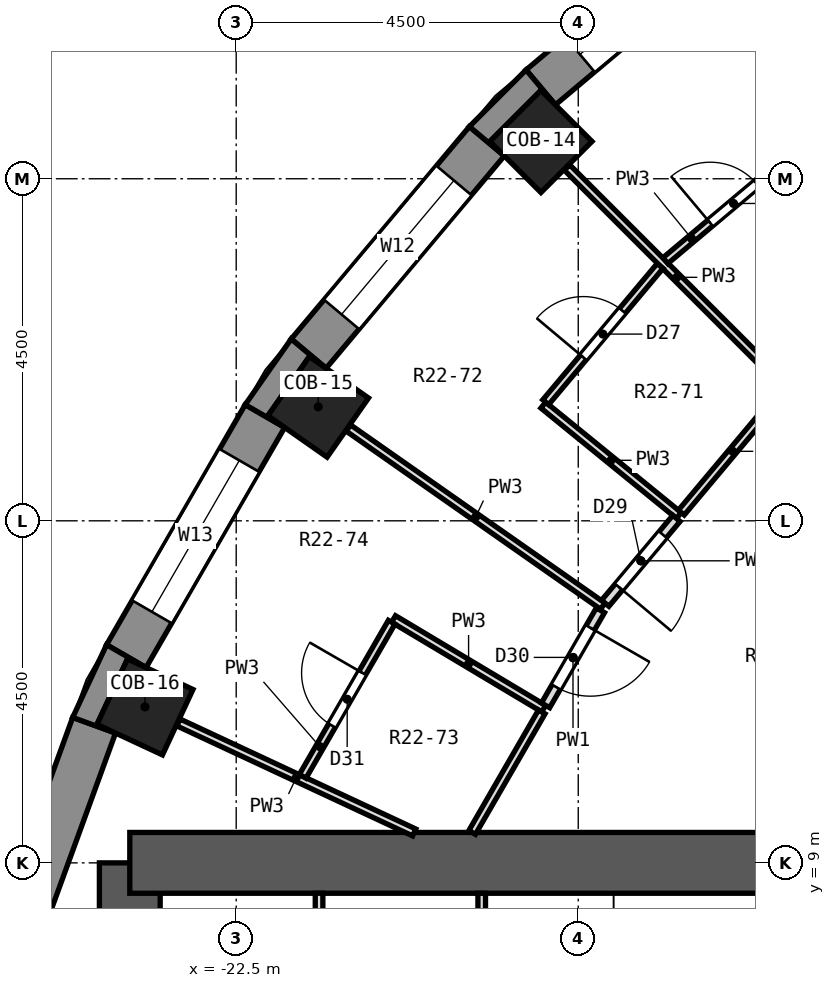
"""IFC4 building model, lengths in metres.
Left out: names, types, materials, properties, quantities, classifications, styles, units other than length and angle.
Written with IfcOpenShell. Run it as: python <this file> out.ifc"""

import sys

from ifc_helpers import new_model, si_unit, direction, frame, frame_2d, origin, origin_2d, place, context, subcontext, project, spatial, polyline, rectangle, outline, extrude, element, fill, save


model = new_model("IFC4")
c1 = context("Model", 3, precision=1e-05, world=origin(), true_north=direction((0.0, 1.0)))
c2 = subcontext(c1, "Body", "Model", "MODEL_VIEW")
j1 = project(units=[si_unit("LENGTHUNIT", "METRE"), si_unit("PLANEANGLEUNIT", "RADIAN")], contexts=[c1])
p1 = place(None, origin())
s1 = spatial("IfcSite", under=j1, at=p1, CompositionType="ELEMENT")
p2 = place(p1, origin())
s2 = spatial("IfcBuilding", under=s1, at=p2, CompositionType="ELEMENT")
p3 = place(p2, frame((0.0, 0.0, 141.4)))
s3 = spatial("IfcBuildingStorey", under=s2, at=p3, CompositionType="ELEMENT", Elevation=141.4)
for number, where, z_axis, x_axis in (
    (1, (-18.491, 18.491, 0.0), (0.0, 0.0, 1.0), (-0.707, 0.707, 0.0)),
    (2, (-21.421, 14.999, 0.0), (0.0, 0.0, 1.0), (-0.819, 0.574, 0.0)),
    (3, (-23.7, 11.052, 0.0), (0.0, 0.0, 1.0), (-0.906, 0.423, 0.0)),
):
    element("IfcColumn", number, at=place(p3, frame(where, z_axis=z_axis, x_axis=x_axis)), inside=s3, PredefinedType="COLUMN", context=c2, shape_type="SweptSolid", body=[
        extrude(rectangle(XDim=0.95, YDim=0.95, at=origin_2d()), origin(), (0.0, 0.0, 1.0), 3.3),
    ])
p4 = place(p3, frame((-23.9, -9.0, 0.0), z_axis=(0.0, 0.0, 1.0), x_axis=(0.0, 1.0, 0.0)))
e4 = element("IfcWall", 4, at=p4, inside=s3, PredefinedType="SHEAR", context=c2, shape_type="SweptSolid", body=[
    extrude(rectangle(XDim=18.0, YDim=0.8, at=frame_2d((9.0, 0.0))), origin(), (0.0, 0.0, 1.0), 3.3),
])
p5 = place(p3, frame((-13.5, 9.0, 0.0), z_axis=(0.0, 0.0, 1.0), x_axis=(-1.0, 0.0, 0.0)))
e5 = element("IfcWall", 5, at=p5, inside=s3, PredefinedType="SHEAR", context=c2, shape_type="SweptSolid", body=[
    extrude(rectangle(XDim=10.4, YDim=0.8, at=frame_2d((5.2, 0.0))), origin(), (0.0, 0.0, 1.0), 3.3),
])
p6 = place(p3, frame((-15.699, 21.547, 0.0), z_axis=(0.0, 0.0, 1.0), x_axis=(-0.766055462616, -0.642774476932, 0.0)))
e6 = element("IfcWall", 6, at=p6, inside=s3, PredefinedType="SOLIDWALL", context=c2, shape_type="SweptSolid", body=[
    extrude(rectangle(XDim=3.648, YDim=0.6, at=frame_2d((1.824, 0.0))), origin(), (0.0, 0.0, 1.0), 2.8),
])
p7 = place(p6, frame((0.674, 0.0, 0.9)))
e7 = element("IfcOpeningElement", 7, at=p7, cuts=e6, PredefinedType="OPENING", context=c2, shape_type="SweptSolid", body=[
    extrude(rectangle(XDim=2.3, YDim=1.8, at=frame_2d((1.15, 0.9))), frame((0.0, 0.312, 0.0), z_axis=(0.0, -1.0, 0.0), x_axis=(1.0, 0.0, 0.0)), (0.0, 0.0, 1.0), 0.624),
])
p8 = place(p3, frame((-19.202, 18.494, 0.0), z_axis=(0.0, 0.0, 1.0), x_axis=(-0.642774476932, -0.766055462616, 0.0)))
e8 = element("IfcWall", 8, at=p8, inside=s3, PredefinedType="SOLIDWALL", context=c2, shape_type="SweptSolid", body=[
    extrude(rectangle(XDim=3.648, YDim=0.6, at=frame_2d((1.824, 0.0))), origin(), (0.0, 0.0, 1.0), 2.8),
])
p9 = place(p8, frame((0.674, 0.0, 0.9)))
e9 = element("IfcOpeningElement", 9, at=p9, cuts=e8, PredefinedType="OPENING", context=c2, shape_type="SweptSolid", body=[
    extrude(rectangle(XDim=2.3, YDim=1.8, at=frame_2d((1.15, 0.9))), frame((0.0, 0.312, 0.0), z_axis=(0.0, -1.0, 0.0), x_axis=(1.0, 0.0, 0.0)), (0.0, 0.0, 1.0), 0.624),
])
p10 = place(p3, frame((-22.122, 14.878, 0.0), z_axis=(0.0, 0.0, 1.0), x_axis=(-0.499954196102, -0.866051847062, 0.0)))
e10 = element("IfcWall", 10, at=p10, inside=s3, PredefinedType="SOLIDWALL", context=c2, shape_type="SweptSolid", body=[
    extrude(rectangle(XDim=3.648, YDim=0.6, at=frame_2d((1.824, 0.0))), origin(), (0.0, 0.0, 1.0), 2.8),
])
p11 = place(p10, frame((0.674, 0.0, 0.9)))
e11 = element("IfcOpeningElement", 11, at=p11, cuts=e10, PredefinedType="OPENING", context=c2, shape_type="SweptSolid", body=[
    extrude(rectangle(XDim=2.3, YDim=1.8, at=frame_2d((1.15, 0.9))), frame((0.0, 0.312, 0.0), z_axis=(0.0, -1.0, 0.0), x_axis=(1.0, 0.0, 0.0)), (0.0, 0.0, 1.0), 0.624),
])
p12 = place(p3, frame((-24.369, 10.811, 0.0), z_axis=(0.0, 0.0, 1.0), x_axis=(-0.341990236633, -0.939703505393, 0.0)))
e12 = element("IfcWall", 12, at=p12, inside=s3, PredefinedType="SOLIDWALL", context=c2, shape_type="SweptSolid", body=[
    extrude(rectangle(XDim=3.648, YDim=0.6, at=frame_2d((1.824, 0.0))), origin(), (0.0, 0.0, 1.0), 2.8),
])
p13 = place(p3, origin())
e13 = element("IfcWall", 13, at=p13, inside=s3, PredefinedType="SOLIDWALL", context=c2, shape_type="SweptSolid", body=[
    extrude(outline(polyline([(-18.686, 19.432), (-19.432, 18.686), (-18.972, 18.301), (-19.163, 18.491), (-18.491, 19.163), (-18.301, 18.972), (-18.686, 19.432)])), origin(), (0.0, 0.0, 1.0), 2.8),
])
p14 = place(p3, origin())
e14 = element("IfcWall", 14, at=p14, inside=s3, PredefinedType="SOLIDWALL", context=c2, shape_type="SweptSolid", body=[
    extrude(outline(polyline([(-22.382, 15.028), (-21.862, 14.728), (-22.083, 14.882), (-21.538, 15.661), (-21.317, 15.506), (-21.777, 15.892), (-22.382, 15.028)])), origin(), (0.0, 0.0, 1.0), 2.8),
])
p15 = place(p3, origin())
e15 = element("IfcWall", 15, at=p15, inside=s3, PredefinedType="SOLIDWALL", context=c2, shape_type="SweptSolid", body=[
    extrude(outline(polyline([(-24.651, 10.913), (-24.087, 10.708), (-24.331, 10.822), (-23.93, 11.683), (-23.686, 11.569), (-24.206, 11.869), (-24.651, 10.913)])), origin(), (0.0, 0.0, 1.0), 2.8),
])
p16 = place(p3, frame((-18.148, 18.148, 0.0), z_axis=(0.0, 0.0, 1.0), x_axis=(0.707106781187, -0.707106781187, 0.0)))
e16 = element("IfcWall", 16, at=p16, inside=s3, PredefinedType="PARTITIONING", context=c2, shape_type="SweptSolid", body=[
    extrude(rectangle(XDim=4.085, YDim=0.1, at=frame_2d((2.043, 0.0))), origin(), (0.0, 0.0, 1.0), 2.8),
])
p17 = place(p3, frame((-18.46, 15.022, 0.0), z_axis=(0.0, 0.0, 1.0), x_axis=(0.775591007639, -0.6312357633, 0.0)))
e17 = element("IfcWall", 17, at=p17, inside=s3, PredefinedType="PARTITIONING", context=c2, shape_type="SweptSolid", body=[
    extrude(rectangle(XDim=2.3, YDim=0.1, at=frame_2d((1.15, 0.0))), origin(), (0.0, 0.0, 1.0), 2.8),
])
p18 = place(p3, frame((-21.024, 14.721, 0.0), z_axis=(0.0, 0.0, 1.0), x_axis=(0.819108383097, -0.573638785945, 0.0)))
e18 = element("IfcWall", 18, at=p18, inside=s3, PredefinedType="PARTITIONING", context=c2, shape_type="SweptSolid", body=[
    extrude(rectangle(XDim=4.086, YDim=0.1, at=frame_2d((2.043, 0.0))), origin(), (0.0, 0.0, 1.0), 2.8),
])
p19 = place(p3, frame((-20.43, 12.209, 0.0), z_axis=(0.0, 0.0, 1.0), x_axis=(0.858446574718, -0.512902991174, 0.0)))
e19 = element("IfcWall", 19, at=p19, inside=s3, PredefinedType="PARTITIONING", context=c2, shape_type="SweptSolid", body=[
    extrude(rectangle(XDim=2.301, YDim=0.1, at=frame_2d((1.15, 0.0))), origin(), (0.0, 0.0, 1.0), 2.8),
])
p20 = place(p3, frame((-23.26, 10.847, 0.0), z_axis=(0.0, 0.0, 1.0), x_axis=(0.906223222272, -0.422799564114, 0.0)))
e20 = element("IfcWall", 20, at=p20, inside=s3, PredefinedType="PARTITIONING", context=c2, shape_type="SweptSolid", body=[
    extrude(rectangle(XDim=3.423, YDim=0.1, at=frame_2d((1.711, 0.0))), origin(), (0.0, 0.0, 1.0), 2.8),
])
p21 = place(p3, frame((-16.853, 16.923, 0.0), z_axis=(0.0, 0.0, 1.0), x_axis=(0.765924716163, 0.642930267735, 0.0)))
e21 = element("IfcWall", 21, at=p21, inside=s3, PredefinedType="PARTITIONING", context=c2, shape_type="SweptSolid", body=[
    extrude(rectangle(XDim=2.34, YDim=0.1, at=frame_2d((1.17, 0.0))), origin(), (0.0, 0.0, 1.0), 2.8),
])
p22 = place(p21, frame((0.769, 0.0, 0.0)))
e22 = element("IfcOpeningElement", 22, at=p22, cuts=e21, PredefinedType="OPENING", context=c2, shape_type="SweptSolid", body=[
    extrude(rectangle(XDim=0.8, YDim=2.1, at=frame_2d((0.4, 1.05))), frame((0.0, 0.062, 0.0), z_axis=(0.0, -1.0, 0.0), x_axis=(1.0, 0.0, 0.0)), (0.0, 0.0, 1.0), 0.124),
])
p23 = place(p3, frame((-16.644, 13.608, 0.0), z_axis=(0.0, 0.0, 1.0), x_axis=(0.642715569181, 0.766104886508, 0.0)))
e23 = element("IfcWall", 23, at=p23, inside=s3, PredefinedType="PARTITIONING", context=c2, shape_type="SweptSolid", body=[
    extrude(rectangle(XDim=2.103, YDim=0.1, at=frame_2d((1.052, 0.0))), origin(), (0.0, 0.0, 1.0), 2.8),
])
p24 = place(p3, frame((-17.645, 12.415, 0.0), z_axis=(0.0, 0.0, 1.0), x_axis=(0.642669367872, 0.766143644233, 0.0)))
e24 = element("IfcWall", 24, at=p24, inside=s3, PredefinedType="PARTITIONING", context=c2, shape_type="SweptSolid", body=[
    extrude(rectangle(XDim=1.457, YDim=0.125, at=frame_2d((0.729, 0.0))), origin(), (0.0, 0.0, 1.0), 2.8),
])
p25 = place(p24, frame((0.279, 0.0, 0.0)))
e25 = element("IfcOpeningElement", 25, at=p25, cuts=e24, PredefinedType="OPENING", context=c2, shape_type="SweptSolid", body=[
    extrude(rectangle(XDim=0.9, YDim=2.1, at=frame_2d((0.45, 1.05))), frame((0.0, 0.074, 0.0), z_axis=(0.0, -1.0, 0.0), x_axis=(1.0, 0.0, 0.0)), (0.0, 0.0, 1.0), 0.149),
])
p26 = place(p3, frame((-18.428, 15.06, 0.0), z_axis=(0.0, 0.0, 1.0), x_axis=(0.642930267735, 0.765924716163, 0.0)))
e26 = element("IfcWall", 26, at=p26, inside=s3, PredefinedType="PARTITIONING", context=c2, shape_type="SweptSolid", body=[
    extrude(rectangle(XDim=2.34, YDim=0.1, at=frame_2d((1.17, 0.0))), origin(), (0.0, 0.0, 1.0), 2.8),
])
p27 = place(p26, frame((0.77, 0.0, 0.0)))
e27 = element("IfcOpeningElement", 27, at=p27, cuts=e26, PredefinedType="OPENING", context=c2, shape_type="SweptSolid", body=[
    extrude(rectangle(XDim=0.8, YDim=2.1, at=frame_2d((0.4, 1.05))), frame((0.0, 0.062, 0.0), z_axis=(0.0, -1.0, 0.0), x_axis=(1.0, 0.0, 0.0)), (0.0, 0.0, 1.0), 0.124),
])
p28 = place(p3, frame((-19.396, 9.4, 0.0), z_axis=(0.0, 0.0, 1.0), x_axis=(0.500210961829, 0.865903570651, 0.0)))
e28 = element("IfcWall", 28, at=p28, inside=s3, PredefinedType="PARTITIONING", context=c2, shape_type="SweptSolid", body=[
    extrude(rectangle(XDim=1.831, YDim=0.1, at=frame_2d((0.916, 0.0))), origin(), (0.0, 0.0, 1.0), 2.8),
])
p29 = place(p3, frame((-18.43, 11.072, 0.0), z_axis=(0.0, 0.0, 1.0), x_axis=(0.499849317439, 0.866112382925, 0.0)))
e29 = element("IfcWall", 29, at=p29, inside=s3, PredefinedType="PARTITIONING", context=c2, shape_type="SweptSolid", body=[
    extrude(rectangle(XDim=1.444, YDim=0.125, at=frame_2d((0.722, 0.0))), origin(), (0.0, 0.0, 1.0), 2.8),
])
p30 = place(p29, frame((0.278, 0.0, 0.0)))
e30 = element("IfcOpeningElement", 30, at=p30, cuts=e29, PredefinedType="OPENING", context=c2, shape_type="SweptSolid", body=[
    extrude(rectangle(XDim=0.9, YDim=2.1, at=frame_2d((0.45, 1.05))), frame((0.0, 0.074, 0.0), z_axis=(0.0, -1.0, 0.0), x_axis=(1.0, 0.0, 0.0)), (0.0, 0.0, 1.0), 0.149),
])
p31 = place(p3, frame((-21.625, 10.139, 0.0), z_axis=(0.0, 0.0, 1.0), x_axis=(0.499999433879, 0.866025730634, 0.0)))
e31 = element("IfcWall", 31, at=p31, inside=s3, PredefinedType="PARTITIONING", context=c2, shape_type="SweptSolid", body=[
    extrude(rectangle(XDim=2.34, YDim=0.1, at=frame_2d((1.17, 0.0))), origin(), (0.0, 0.0, 1.0), 2.8),
])
p32 = place(p31, frame((0.77, 0.0, 0.0)))
e32 = element("IfcOpeningElement", 32, at=p32, cuts=e31, PredefinedType="OPENING", context=c2, shape_type="SweptSolid", body=[
    extrude(rectangle(XDim=0.8, YDim=2.1, at=frame_2d((0.4, 1.05))), frame((0.0, 0.062, 0.0), z_axis=(0.0, -1.0, 0.0), x_axis=(1.0, 0.0, 0.0)), (0.0, 0.0, 1.0), 0.124),
])
p33 = place(p3, frame((-19.27, 5.25, 0.0), z_axis=(0.0, 0.0, 1.0), x_axis=(0.0, 1.0, 0.0)))
e33 = element("IfcWall", 33, at=p33, inside=s3, PredefinedType="PARTITIONING", context=c2, shape_type="SweptSolid", body=[
    extrude(rectangle(XDim=3.35, YDim=0.1, at=frame_2d((1.675, 0.0))), origin(), (0.0, 0.0, 1.0), 2.8),
])
p34 = place(p3, frame((-21.41, 5.25, 0.0), z_axis=(0.0, 0.0, 1.0), x_axis=(0.0, 1.0, 0.0)))
e34 = element("IfcWall", 34, at=p34, inside=s3, PredefinedType="PARTITIONING", context=c2, shape_type="SweptSolid", body=[
    extrude(rectangle(XDim=3.35, YDim=0.1, at=frame_2d((1.675, 0.0))), origin(), (0.0, 0.0, 1.0), 2.8),
])
p35 = place(p34, frame((1.225, 0.0, 0.0)))
e35 = element("IfcOpeningElement", 35, at=p35, cuts=e34, PredefinedType="OPENING", context=c2, shape_type="SweptSolid", body=[
    extrude(rectangle(XDim=0.9, YDim=2.1, at=frame_2d((0.45, 1.05))), frame((0.0, 0.062, 0.0), z_axis=(0.0, -1.0, 0.0), x_axis=(1.0, 0.0, 0.0)), (0.0, 0.0, 1.0), 0.124),
])
p36 = place(p7, origin())
e36 = element("IfcWindow", 36, at=p36, inside=s3, PartitioningType="SINGLE_PANEL", PredefinedType="WINDOW", context=c2, shape_type="SweptSolid", body=[
    extrude(rectangle(XDim=2.3, YDim=1.8, at=frame_2d((1.15, 0.9))), frame((0.0, 0.18, 0.0), z_axis=(0.0, -1.0, 0.0), x_axis=(1.0, 0.0, 0.0)), (0.0, 0.0, 1.0), 0.06),
])
fill(e7, e36)
p37 = place(p9, origin())
e37 = element("IfcWindow", 37, at=p37, inside=s3, PartitioningType="SINGLE_PANEL", PredefinedType="WINDOW", context=c2, shape_type="SweptSolid", body=[
    extrude(rectangle(XDim=2.3, YDim=1.8, at=frame_2d((1.15, 0.9))), frame((0.0, 0.18, 0.0), z_axis=(0.0, -1.0, 0.0), x_axis=(1.0, 0.0, 0.0)), (0.0, 0.0, 1.0), 0.06),
])
fill(e9, e37)
p38 = place(p11, origin())
e38 = element("IfcWindow", 38, at=p38, inside=s3, PartitioningType="SINGLE_PANEL", PredefinedType="WINDOW", context=c2, shape_type="SweptSolid", body=[
    extrude(rectangle(XDim=2.3, YDim=1.8, at=frame_2d((1.15, 0.9))), frame((0.0, 0.18, 0.0), z_axis=(0.0, -1.0, 0.0), x_axis=(1.0, 0.0, 0.0)), (0.0, 0.0, 1.0), 0.06),
])
fill(e11, e38)
p39 = place(p22, origin())
e39 = element("IfcDoor", 39, at=p39, inside=s3, OperationType="SINGLE_SWING_LEFT", PredefinedType="DOOR", context=c2, shape_type="SweptSolid", body=[
    extrude(rectangle(XDim=0.8, YDim=2.1, at=frame_2d((0.4, 1.05))), frame((0.0, 0.025, 0.0), z_axis=(0.0, -1.0, 0.0), x_axis=(1.0, 0.0, 0.0)), (0.0, 0.0, 1.0), 0.05),
])
fill(e22, e39)
p40 = place(p27, origin())
e40 = element("IfcDoor", 40, at=p40, inside=s3, OperationType="SINGLE_SWING_LEFT", PredefinedType="DOOR", context=c2, shape_type="SweptSolid", body=[
    extrude(rectangle(XDim=0.8, YDim=2.1, at=frame_2d((0.4, 1.05))), frame((0.0, 0.025, 0.0), z_axis=(0.0, -1.0, 0.0), x_axis=(1.0, 0.0, 0.0)), (0.0, 0.0, 1.0), 0.05),
])
fill(e27, e40)
p41 = place(p25, frame((0.9, 0.0, 0.0), z_axis=(0.0, 0.0, 1.0), x_axis=(-1.0, 0.0, 0.0)))
e41 = element("IfcDoor", 41, at=p41, inside=s3, OperationType="SINGLE_SWING_RIGHT", PredefinedType="DOOR", context=c2, shape_type="SweptSolid", body=[
    extrude(rectangle(XDim=0.9, YDim=2.1, at=frame_2d((0.45, 1.05))), frame((0.0, 0.025, 0.0), z_axis=(0.0, -1.0, 0.0), x_axis=(1.0, 0.0, 0.0)), (0.0, 0.0, 1.0), 0.05),
])
fill(e25, e41)
p42 = place(p30, frame((0.9, 0.0, 0.0), z_axis=(0.0, 0.0, 1.0), x_axis=(-1.0, 0.0, 0.0)))
e42 = element("IfcDoor", 42, at=p42, inside=s3, OperationType="SINGLE_SWING_LEFT", PredefinedType="DOOR", context=c2, shape_type="SweptSolid", body=[
    extrude(rectangle(XDim=0.9, YDim=2.1, at=frame_2d((0.45, 1.05))), frame((0.0, 0.025, 0.0), z_axis=(0.0, -1.0, 0.0), x_axis=(1.0, 0.0, 0.0)), (0.0, 0.0, 1.0), 0.05),
])
fill(e30, e42)
p43 = place(p32, origin())
e43 = element("IfcDoor", 43, at=p43, inside=s3, OperationType="SINGLE_SWING_RIGHT", PredefinedType="DOOR", context=c2, shape_type="SweptSolid", body=[
    extrude(rectangle(XDim=0.8, YDim=2.1, at=frame_2d((0.4, 1.05))), frame((0.0, 0.025, 0.0), z_axis=(0.0, -1.0, 0.0), x_axis=(1.0, 0.0, 0.0)), (0.0, 0.0, 1.0), 0.05),
])
fill(e32, e43)
save(model, sys.argv[1])
